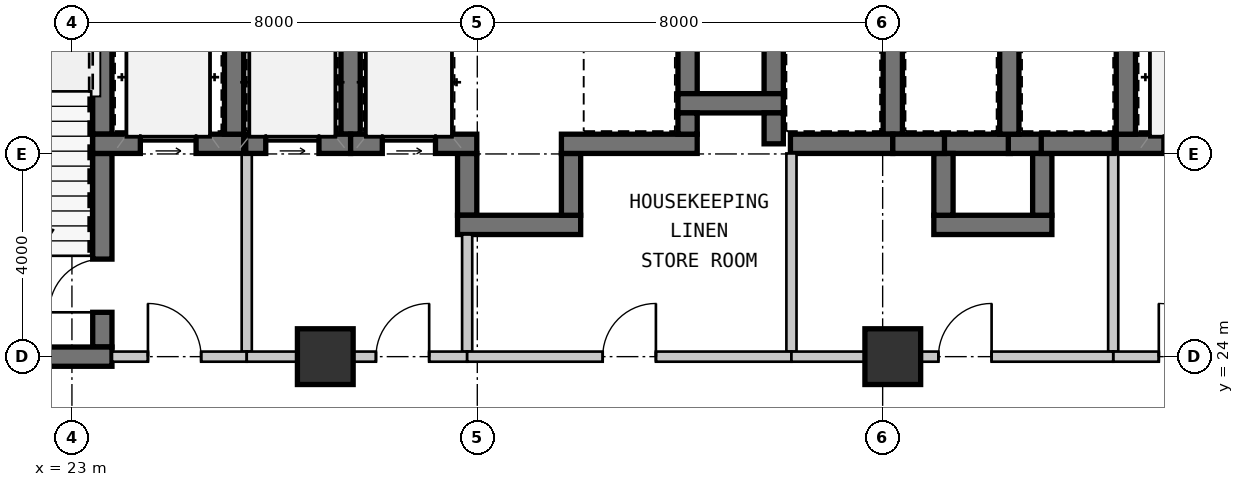
"""IFC4 building model, lengths in metres.
Left out: names, types, materials, properties, quantities, classifications, styles, units other than length and angle.
Written with IfcOpenShell. Run it as: python <this file> out.ifc"""

import sys

from ifc_helpers import new_model, si_unit, direction, frame, frame_2d, origin, origin_2d, place, context, subcontext, project, spatial, rectangle, extrude, source, transform, mapped, element, fill, save


model = new_model("IFC4")
c1 = context("Model", 3, precision=1e-05, world=origin(), true_north=direction((0.0, 1.0)))
c2 = subcontext(c1, "Body", "Model", "MODEL_VIEW")
j1 = project(units=[si_unit("LENGTHUNIT", "METRE"), si_unit("PLANEANGLEUNIT", "RADIAN")], contexts=[c1])
p1 = place(None, origin())
s1 = spatial("IfcSite", under=j1, at=p1, CompositionType="ELEMENT")
p2 = place(p1, origin())
s2 = spatial("IfcBuilding", under=s1, at=p2, CompositionType="ELEMENT")
p3 = place(p2, frame((0.0, 0.0, 16.8)))
s3 = spatial("IfcBuildingStorey", under=s2, at=p3, CompositionType="ELEMENT", Elevation=16.8)
m1 = source(origin(), c2, "Body", "SweptSolid", [
    extrude(rectangle(XDim=1.1, YDim=1.1, at=origin_2d()), origin(), (0.0, 0.0, 1.0), 3.15),
])
for number, where, z_axis, x_axis in (
    (1, (28.0, 24.0, 0.0), (0.0, 0.0, 1.0), (1.0, 0.0, 0.0)),
    (2, (39.2, 24.0, 0.0), (0.0, 0.0, 1.0), (1.0, 0.0, 0.0)),
):
    element("IfcColumn", number, at=place(p3, frame(where, z_axis=z_axis, x_axis=x_axis)), inside=s3, PredefinedType="COLUMN", context=c2, shape_type="MappedRepresentation", body=[
        mapped(m1, transform((0.0, 0.0, 0.0), scale=1.0)),
    ])
m2 = source(origin(), c2, "Body", "SweptSolid", [
    extrude(rectangle(XDim=3.42, YDim=0.38, at=frame_2d((1.71, 0.0))), origin(), (0.0, 0.0, 1.0), 2.93),
])
p4 = place(p3, frame((23.6, 28.39, 0.0), z_axis=(0.0, 0.0, 1.0), x_axis=(0.0, 1.0, 0.0)))
e3 = element("IfcWall", 3, at=p4, inside=s3, PredefinedType="SHEAR", context=c2, shape_type="MappedRepresentation", body=[
    mapped(m2, transform((0.0, 0.0, 0.0), scale=1.0)),
])
m3 = source(origin(), c2, "Body", "SweptSolid", [
    extrude(rectangle(XDim=3.82, YDim=0.38, at=frame_2d((1.91, 0.0))), origin(), (0.0, 0.0, 1.0), 2.93),
])
p5 = place(p3, frame((23.6, 24.19, 0.0), z_axis=(0.0, 0.0, 1.0), x_axis=(0.0, 1.0, 0.0)))
e4 = element("IfcWall", 4, at=p5, inside=s3, PredefinedType="SHEAR", context=c2, shape_type="MappedRepresentation", body=[
    mapped(m3, transform((0.0, 0.0, 0.0), scale=1.0)),
])
m4 = source(origin(), c2, "Body", "SweptSolid", [
    extrude(rectangle(XDim=1.05, YDim=2.1, at=frame_2d((0.525, 1.05))), frame((0.0, 0.2, 0.0), z_axis=(0.0, -1.0, 0.0), x_axis=(1.0, 0.0, 0.0)), (0.0, 0.0, 1.0), 0.4),
])
p6 = place(p5, frame((0.685, 0.0, 0.0)))
e5 = element("IfcOpeningElement", 5, at=p6, cuts=e4, PredefinedType="OPENING", context=c2, shape_type="MappedRepresentation", body=[
    mapped(m4, transform((0.0, 0.0, 0.0), scale=1.0)),
])
m5 = source(origin(), c2, "Body", "SweptSolid", [
    extrude(rectangle(XDim=4.98, YDim=0.38, at=frame_2d((2.49, 0.0))), origin(), (0.0, 0.0, 1.0), 2.93),
])
p7 = place(p3, frame((18.81, 24.0, 0.0), z_axis=(0.0, 0.0, 1.0), x_axis=(1.0, 0.0, 0.0)))
e6 = element("IfcWall", 6, at=p7, inside=s3, PredefinedType="SHEAR", context=c2, shape_type="MappedRepresentation", body=[
    mapped(m5, transform((0.0, 0.0, 0.0), scale=1.0)),
])
m6 = source(origin(), c2, "Body", "SweptSolid", [
    extrude(rectangle(XDim=2.98, YDim=0.38, at=frame_2d((1.49, 0.0))), origin(), (0.0, 0.0, 1.0), 2.93),
])
p8 = place(p3, frame((23.41, 28.2, 0.0), z_axis=(0.0, 0.0, 1.0), x_axis=(1.0, 0.0, 0.0)))
e7 = element("IfcWall", 7, at=p8, inside=s3, PredefinedType="SHEAR", context=c2, shape_type="MappedRepresentation", body=[
    mapped(m6, transform((0.0, 0.0, 0.0), scale=1.0)),
])
m7 = source(origin(), c2, "Body", "SweptSolid", [
    extrude(rectangle(XDim=1.1, YDim=2.15, at=frame_2d((0.55, 1.075))), frame((0.0, 0.2, 0.0), z_axis=(0.0, -1.0, 0.0), x_axis=(1.0, 0.0, 0.0)), (0.0, 0.0, 1.0), 0.4),
])
p9 = place(p8, frame((0.94, 0.0, 0.0)))
e8 = element("IfcOpeningElement", 8, at=p9, cuts=e7, PredefinedType="OPENING", context=c2, shape_type="MappedRepresentation", body=[
    mapped(m7, transform((0.0, 0.0, 0.0), scale=1.0)),
])
p10 = place(p3, frame((26.2, 28.39, 0.0), z_axis=(0.0, 0.0, 1.0), x_axis=(0.0, 1.0, 0.0)))
e9 = element("IfcWall", 9, at=p10, inside=s3, PredefinedType="SHEAR", context=c2, shape_type="MappedRepresentation", body=[
    mapped(m2, transform((0.0, 0.0, 0.0), scale=1.0)),
])
m8 = source(origin(), c2, "Body", "SweptSolid", [
    extrude(rectangle(XDim=3.91, YDim=0.2, at=frame_2d((1.955, 0.0))), origin(), (0.0, 0.0, 1.0), 2.93),
])
p11 = place(p3, frame((26.45, 24.1, 0.0), z_axis=(0.0, 0.0, 1.0), x_axis=(0.0, 1.0, 0.0)))
e10 = element("IfcWall", 10, at=p11, inside=s3, PredefinedType="SOLIDWALL", context=c2, shape_type="MappedRepresentation", body=[
    mapped(m8, transform((0.0, 0.0, 0.0), scale=1.0)),
])
m9 = source(origin(), c2, "Body", "SweptSolid", [
    extrude(rectangle(XDim=2.66, YDim=0.2, at=frame_2d((1.33, 0.0))), origin(), (0.0, 0.0, 1.0), 2.47),
])
p12 = place(p3, frame((23.79, 24.0, 0.0), z_axis=(0.0, 0.0, 1.0), x_axis=(1.0, 0.0, 0.0)))
e11 = element("IfcWall", 11, at=p12, inside=s3, PredefinedType="SOLIDWALL", context=c2, shape_type="MappedRepresentation", body=[
    mapped(m9, transform((0.0, 0.0, 0.0), scale=1.0)),
])
m10 = source(origin(), c2, "Body", "SweptSolid", [
    extrude(rectangle(XDim=1.05, YDim=2.1, at=frame_2d((0.525, 1.05))), frame((0.0, 0.11, 0.0), z_axis=(0.0, -1.0, 0.0), x_axis=(1.0, 0.0, 0.0)), (0.0, 0.0, 1.0), 0.22),
])
p13 = place(p12, frame((0.71, 0.0, 0.0)))
e12 = element("IfcOpeningElement", 12, at=p13, cuts=e11, PredefinedType="OPENING", context=c2, shape_type="MappedRepresentation", body=[
    mapped(m10, transform((0.0, 0.0, 0.0), scale=1.0)),
])
p14 = place(p3, frame((43.61, 28.2, 0.0), z_axis=(0.0, 0.0, 1.0), x_axis=(1.0, 0.0, 0.0)))
e13 = element("IfcWall", 13, at=p14, inside=s3, PredefinedType="SHEAR", context=c2, shape_type="MappedRepresentation", body=[
    mapped(m6, transform((0.0, 0.0, 0.0), scale=1.0)),
])
p15 = place(p14, frame((0.94, 0.0, 0.0)))
e14 = element("IfcOpeningElement", 14, at=p15, cuts=e13, PredefinedType="OPENING", context=c2, shape_type="MappedRepresentation", body=[
    mapped(m7, transform((0.0, 0.0, 0.0), scale=1.0)),
])
p16 = place(p3, frame((43.8, 31.81, 0.0), z_axis=(0.0, 0.0, 1.0), x_axis=(0.0, -1.0, 0.0)))
e15 = element("IfcWall", 15, at=p16, inside=s3, PredefinedType="SHEAR", context=c2, shape_type="MappedRepresentation", body=[
    mapped(m2, transform((0.0, 0.0, 0.0), scale=1.0)),
])
p17 = place(p3, frame((43.55, 28.01, 0.0), z_axis=(0.0, 0.0, 1.0), x_axis=(0.0, -1.0, 0.0)))
e16 = element("IfcWall", 16, at=p17, inside=s3, PredefinedType="SOLIDWALL", context=c2, shape_type="MappedRepresentation", body=[
    mapped(m8, transform((0.0, 0.0, 0.0), scale=1.0)),
])
m11 = source(origin(), c2, "Body", "SweptSolid", [
    extrude(rectangle(XDim=2.66, YDim=0.2, at=frame_2d((1.33, 0.0))), origin(), (0.0, 0.0, 1.0), 2.397),
])
p18 = place(p3, frame((43.55, 24.0, 0.0), z_axis=(0.0, 0.0, 1.0), x_axis=(1.0, 0.0, 0.0)))
e17 = element("IfcWall", 17, at=p18, inside=s3, PredefinedType="SOLIDWALL", context=c2, shape_type="MappedRepresentation", body=[
    mapped(m11, transform((0.0, 0.0, 0.0), scale=1.0)),
])
p19 = place(p18, frame((0.9, 0.0, 0.0)))
e18 = element("IfcOpeningElement", 18, at=p19, cuts=e17, PredefinedType="OPENING", context=c2, shape_type="MappedRepresentation", body=[
    mapped(m10, transform((0.0, 0.0, 0.0), scale=1.0)),
])
m12 = source(origin(), c2, "Body", "SweptSolid", [
    extrude(rectangle(XDim=1.12, YDim=0.38, at=frame_2d((0.56, 0.0))), origin(), (0.0, 0.0, 1.0), 2.93),
])
for number, where, z_axis, x_axis in (
    (19, (35.15, 30.31, 0.0), (0.0, 0.0, 1.0), (0.0, -1.0, 0.0)),
    (20, (36.85, 29.19, 0.0), (0.0, 0.0, 1.0), (0.0, 1.0, 0.0)),
):
    element("IfcWall", number, at=place(p3, frame(where, z_axis=z_axis, x_axis=x_axis)), inside=s3, PredefinedType="SHEAR", context=c2, shape_type="MappedRepresentation", body=[
        mapped(m12, transform((0.0, 0.0, 0.0), scale=1.0)),
    ])
m13 = source(origin(), c2, "Body", "SweptSolid", [
    extrude(rectangle(XDim=2.08, YDim=0.38, at=frame_2d((1.04, 0.0))), origin(), (0.0, 0.0, 1.0), 2.93),
])
p20 = place(p3, frame((34.96, 29.0, 0.0), z_axis=(0.0, 0.0, 1.0), x_axis=(1.0, 0.0, 0.0)))
e21 = element("IfcWall", 21, at=p20, inside=s3, PredefinedType="SHEAR", context=c2, shape_type="MappedRepresentation", body=[
    mapped(m13, transform((0.0, 0.0, 0.0), scale=1.0)),
])
m14 = source(origin(), c2, "Body", "SweptSolid", [
    extrude(rectangle(XDim=1.22, YDim=0.38, at=frame_2d((0.61, 0.0))), origin(), (0.0, 0.0, 1.0), 2.93),
])
p21 = place(p3, frame((30.8, 28.01, 0.0), z_axis=(0.0, 0.0, 1.0), x_axis=(0.0, -1.0, 0.0)))
e22 = element("IfcWall", 22, at=p21, inside=s3, PredefinedType="SHEAR", context=c2, shape_type="MappedRepresentation", body=[
    mapped(m14, transform((0.0, 0.0, 0.0), scale=1.0)),
])
m15 = source(origin(), c2, "Body", "SweptSolid", [
    extrude(rectangle(XDim=2.43, YDim=0.38, at=frame_2d((1.215, 0.0))), origin(), (0.0, 0.0, 1.0), 2.93),
])
p22 = place(p3, frame((30.61, 26.6, 0.0), z_axis=(0.0, 0.0, 1.0), x_axis=(1.0, 0.0, 0.0)))
e23 = element("IfcWall", 23, at=p22, inside=s3, PredefinedType="SHEAR", context=c2, shape_type="MappedRepresentation", body=[
    mapped(m15, transform((0.0, 0.0, 0.0), scale=1.0)),
])
p23 = place(p3, frame((32.85, 26.79, 0.0), z_axis=(0.0, 0.0, 1.0), x_axis=(0.0, 1.0, 0.0)))
e24 = element("IfcWall", 24, at=p23, inside=s3, PredefinedType="SHEAR", context=c2, shape_type="MappedRepresentation", body=[
    mapped(m14, transform((0.0, 0.0, 0.0), scale=1.0)),
])
m16 = source(origin(), c2, "Body", "SweptSolid", [
    extrude(rectangle(XDim=1.32, YDim=0.38, at=frame_2d((0.66, 0.0))), origin(), (0.0, 0.0, 1.0), 2.93),
])
p24 = place(p3, frame((41.52, 28.2, 0.0), z_axis=(0.0, 0.0, 1.0), x_axis=(-1.0, 0.0, 0.0)))
e25 = element("IfcWall", 25, at=p24, inside=s3, PredefinedType="SHEAR", context=c2, shape_type="MappedRepresentation", body=[
    mapped(m16, transform((0.0, 0.0, 0.0), scale=1.0)),
])
m17 = source(origin(), c2, "Body", "SweptSolid", [
    extrude(rectangle(XDim=0.67, YDim=0.38, at=frame_2d((0.335, 0.0))), origin(), (0.0, 0.0, 1.0), 2.93),
])
p25 = place(p3, frame((42.15, 28.2, 0.0), z_axis=(0.0, 0.0, 1.0), x_axis=(-1.0, 0.0, 0.0)))
e26 = element("IfcWall", 26, at=p25, inside=s3, PredefinedType="SHEAR", context=c2, shape_type="MappedRepresentation", body=[
    mapped(m17, transform((0.0, 0.0, 0.0), scale=1.0)),
])
m18 = source(origin(), c2, "Body", "SweptSolid", [
    extrude(rectangle(XDim=2.33, YDim=0.38, at=frame_2d((1.165, 0.0))), origin(), (0.0, 0.0, 1.0), 2.93),
])
p26 = place(p3, frame((40.01, 26.6, 0.0), z_axis=(0.0, 0.0, 1.0), x_axis=(1.0, 0.0, 0.0)))
e27 = element("IfcWall", 27, at=p26, inside=s3, PredefinedType="SHEAR", context=c2, shape_type="MappedRepresentation", body=[
    mapped(m18, transform((0.0, 0.0, 0.0), scale=1.0)),
])
for number, where, z_axis, x_axis in (
    (28, (40.2, 28.01, 0.0), (0.0, 0.0, 1.0), (0.0, -1.0, 0.0)),
    (29, (42.15, 26.79, 0.0), (0.0, 0.0, 1.0), (0.0, 1.0, 0.0)),
):
    element("IfcWall", number, at=place(p3, frame(where, z_axis=z_axis, x_axis=x_axis)), inside=s3, PredefinedType="SHEAR", context=c2, shape_type="MappedRepresentation", body=[
        mapped(m14, transform((0.0, 0.0, 0.0), scale=1.0)),
    ])
p27 = place(p3, frame((28.5, 28.39, 0.0), z_axis=(0.0, 0.0, 1.0), x_axis=(0.0, 1.0, 0.0)))
e30 = element("IfcWall", 30, at=p27, inside=s3, PredefinedType="SHEAR", context=c2, shape_type="MappedRepresentation", body=[
    mapped(m2, transform((0.0, 0.0, 0.0), scale=1.0)),
])
m19 = source(origin(), c2, "Body", "SweptSolid", [
    extrude(rectangle(XDim=2.07, YDim=0.38, at=frame_2d((1.035, 0.0))), origin(), (0.0, 0.0, 1.0), 2.93),
])
p28 = place(p3, frame((26.43, 28.2, 0.0), z_axis=(0.0, 0.0, 1.0), x_axis=(1.0, 0.0, 0.0)))
e31 = element("IfcWall", 31, at=p28, inside=s3, PredefinedType="SHEAR", context=c2, shape_type="MappedRepresentation", body=[
    mapped(m19, transform((0.0, 0.0, 0.0), scale=1.0)),
])
m20 = source(origin(), c2, "Body", "SweptSolid", [
    extrude(rectangle(XDim=1.05, YDim=2.15, at=frame_2d((0.525, 1.075))), frame((0.0, 0.2, 0.0), z_axis=(0.0, -1.0, 0.0), x_axis=(1.0, 0.0, 0.0)), (0.0, 0.0, 1.0), 0.4),
])
p29 = place(p28, frame((0.395, 0.0, 0.0)))
e32 = element("IfcOpeningElement", 32, at=p29, cuts=e31, PredefinedType="OPENING", context=c2, shape_type="MappedRepresentation", body=[
    mapped(m20, transform((0.0, 0.0, 0.0), scale=1.0)),
])
m21 = source(origin(), c2, "Body", "SweptSolid", [
    extrude(rectangle(XDim=2.49, YDim=0.38, at=frame_2d((1.245, 0.0))), origin(), (0.0, 0.0, 1.0), 2.93),
])
p30 = place(p3, frame((28.5, 28.2, 0.0), z_axis=(0.0, 0.0, 1.0), x_axis=(1.0, 0.0, 0.0)))
e33 = element("IfcWall", 33, at=p30, inside=s3, PredefinedType="SHEAR", context=c2, shape_type="MappedRepresentation", body=[
    mapped(m21, transform((0.0, 0.0, 0.0), scale=1.0)),
])
p31 = place(p30, frame((0.625, 0.0, 0.0)))
e34 = element("IfcOpeningElement", 34, at=p31, cuts=e33, PredefinedType="OPENING", context=c2, shape_type="MappedRepresentation", body=[
    mapped(m20, transform((0.0, 0.0, 0.0), scale=1.0)),
])
m22 = source(origin(), c2, "Body", "SweptSolid", [
    extrude(rectangle(XDim=2.31, YDim=0.2, at=frame_2d((1.155, 0.0))), origin(), (0.0, 0.0, 1.0), 2.93),
])
p32 = place(p3, frame((30.8, 26.41, 0.0), z_axis=(0.0, 0.0, 1.0), x_axis=(0.0, -1.0, 0.0)))
e35 = element("IfcWall", 35, at=p32, inside=s3, PredefinedType="SOLIDWALL", context=c2, shape_type="MappedRepresentation", body=[
    mapped(m22, transform((0.0, 0.0, 0.0), scale=1.0)),
])
m23 = source(origin(), c2, "Body", "SweptSolid", [
    extrude(rectangle(XDim=4.35, YDim=0.2, at=frame_2d((2.175, 0.0))), origin(), (0.0, 0.0, 1.0), 2.47),
])
p33 = place(p3, frame((30.8, 24.0, 0.0), z_axis=(0.0, 0.0, 1.0), x_axis=(-1.0, 0.0, 0.0)))
e36 = element("IfcWall", 36, at=p33, inside=s3, PredefinedType="SOLIDWALL", context=c2, shape_type="MappedRepresentation", body=[
    mapped(m23, transform((0.0, 0.0, 0.0), scale=1.0)),
])
p34 = place(p33, frame((0.75, 0.0, 0.0)))
e37 = element("IfcOpeningElement", 37, at=p34, cuts=e36, PredefinedType="OPENING", context=c2, shape_type="MappedRepresentation", body=[
    mapped(m10, transform((0.0, 0.0, 0.0), scale=1.0)),
])
m24 = source(origin(), c2, "Body", "SweptSolid", [
    extrude(rectangle(XDim=2.68, YDim=0.38, at=frame_2d((1.34, 0.0))), origin(), (0.0, 0.0, 1.0), 2.93),
])
p35 = place(p3, frame((32.66, 28.2, 0.0), z_axis=(0.0, 0.0, 1.0), x_axis=(1.0, 0.0, 0.0)))
e38 = element("IfcWall", 38, at=p35, inside=s3, PredefinedType="SHEAR", context=c2, shape_type="MappedRepresentation", body=[
    mapped(m24, transform((0.0, 0.0, 0.0), scale=1.0)),
])
m25 = source(origin(), c2, "Body", "SweptSolid", [
    extrude(rectangle(XDim=0.42, YDim=0.38, at=frame_2d((0.21, 0.0))), origin(), (0.0, 0.0, 1.0), 2.93),
])
p36 = place(p3, frame((35.15, 28.39, 0.0), z_axis=(0.0, 0.0, 1.0), x_axis=(0.0, 1.0, 0.0)))
e39 = element("IfcWall", 39, at=p36, inside=s3, PredefinedType="SHEAR", context=c2, shape_type="MappedRepresentation", body=[
    mapped(m25, transform((0.0, 0.0, 0.0), scale=1.0)),
])
p37 = place(p3, frame((39.2, 28.39, 0.0), z_axis=(0.0, 0.0, 1.0), x_axis=(0.0, 1.0, 0.0)))
e40 = element("IfcWall", 40, at=p37, inside=s3, PredefinedType="SHEAR", context=c2, shape_type="MappedRepresentation", body=[
    mapped(m2, transform((0.0, 0.0, 0.0), scale=1.0)),
])
m26 = source(origin(), c2, "Body", "SweptSolid", [
    extrude(rectangle(XDim=0.61, YDim=0.38, at=frame_2d((0.305, 0.0))), origin(), (0.0, 0.0, 1.0), 2.93),
])
p38 = place(p3, frame((36.85, 28.81, 0.0), z_axis=(0.0, 0.0, 1.0), x_axis=(0.0, -1.0, 0.0)))
e41 = element("IfcWall", 41, at=p38, inside=s3, PredefinedType="SHEAR", context=c2, shape_type="MappedRepresentation", body=[
    mapped(m26, transform((0.0, 0.0, 0.0), scale=1.0)),
])
m27 = source(origin(), c2, "Body", "SweptSolid", [
    extrude(rectangle(XDim=2.02, YDim=0.38, at=frame_2d((1.01, 0.0))), origin(), (0.0, 0.0, 1.0), 2.93),
])
p39 = place(p3, frame((37.18, 28.2, 0.0), z_axis=(0.0, 0.0, 1.0), x_axis=(1.0, 0.0, 0.0)))
e42 = element("IfcWall", 42, at=p39, inside=s3, PredefinedType="SHEAR", context=c2, shape_type="MappedRepresentation", body=[
    mapped(m27, transform((0.0, 0.0, 0.0), scale=1.0)),
])
p40 = place(p3, frame((41.5, 28.39, 0.0), z_axis=(0.0, 0.0, 1.0), x_axis=(0.0, 1.0, 0.0)))
e43 = element("IfcWall", 43, at=p40, inside=s3, PredefinedType="SHEAR", context=c2, shape_type="MappedRepresentation", body=[
    mapped(m2, transform((0.0, 0.0, 0.0), scale=1.0)),
])
m28 = source(origin(), c2, "Body", "SweptSolid", [
    extrude(rectangle(XDim=1.02, YDim=0.38, at=frame_2d((0.51, 0.0))), origin(), (0.0, 0.0, 1.0), 2.93),
])
p41 = place(p3, frame((39.2, 28.2, 0.0), z_axis=(0.0, 0.0, 1.0), x_axis=(1.0, 0.0, 0.0)))
e44 = element("IfcWall", 44, at=p41, inside=s3, PredefinedType="SHEAR", context=c2, shape_type="MappedRepresentation", body=[
    mapped(m28, transform((0.0, 0.0, 0.0), scale=1.0)),
])
m29 = source(origin(), c2, "Body", "SweptSolid", [
    extrude(rectangle(XDim=1.44, YDim=0.38, at=frame_2d((0.72, 0.0))), origin(), (0.0, 0.0, 1.0), 2.93),
])
p42 = place(p3, frame((42.13, 28.2, 0.0), z_axis=(0.0, 0.0, 1.0), x_axis=(1.0, 0.0, 0.0)))
e45 = element("IfcWall", 45, at=p42, inside=s3, PredefinedType="SHEAR", context=c2, shape_type="MappedRepresentation", body=[
    mapped(m29, transform((0.0, 0.0, 0.0), scale=1.0)),
])
p43 = place(p3, frame((37.2, 28.01, 0.0), z_axis=(0.0, 0.0, 1.0), x_axis=(0.0, -1.0, 0.0)))
e46 = element("IfcWall", 46, at=p43, inside=s3, PredefinedType="SOLIDWALL", context=c2, shape_type="MappedRepresentation", body=[
    mapped(m8, transform((0.0, 0.0, 0.0), scale=1.0)),
])
m30 = source(origin(), c2, "Body", "SweptSolid", [
    extrude(rectangle(XDim=6.4, YDim=0.2, at=frame_2d((3.2, 0.0))), origin(), (0.0, 0.0, 1.0), 2.47),
])
p44 = place(p3, frame((37.2, 24.0, 0.0), z_axis=(0.0, 0.0, 1.0), x_axis=(-1.0, 0.0, 0.0)))
e47 = element("IfcWall", 47, at=p44, inside=s3, PredefinedType="SOLIDWALL", context=c2, shape_type="MappedRepresentation", body=[
    mapped(m30, transform((0.0, 0.0, 0.0), scale=1.0)),
])
p45 = place(p44, frame((2.675, 0.0, 0.0)))
e48 = element("IfcOpeningElement", 48, at=p45, cuts=e47, PredefinedType="OPENING", context=c2, shape_type="MappedRepresentation", body=[
    mapped(m10, transform((0.0, 0.0, 0.0), scale=1.0)),
])
m31 = source(origin(), c2, "Body", "SweptSolid", [
    extrude(rectangle(XDim=4.35, YDim=0.2, at=frame_2d((2.175, 0.0))), origin(), (0.0, 0.0, 1.0), 2.397),
])
p46 = place(p3, frame((43.55, 24.0, 0.0), z_axis=(0.0, 0.0, 1.0), x_axis=(-1.0, 0.0, 0.0)))
e49 = element("IfcWall", 49, at=p46, inside=s3, PredefinedType="SOLIDWALL", context=c2, shape_type="MappedRepresentation", body=[
    mapped(m31, transform((0.0, 0.0, 0.0), scale=1.0)),
])
p47 = place(p46, frame((2.4, 0.0, 0.0)))
e50 = element("IfcOpeningElement", 50, at=p47, cuts=e49, PredefinedType="OPENING", context=c2, shape_type="MappedRepresentation", body=[
    mapped(m10, transform((0.0, 0.0, 0.0), scale=1.0)),
])
m32 = source(origin(), c2, "Body", "SweptSolid", [
    extrude(rectangle(XDim=2.0, YDim=0.2, at=frame_2d((1.0, 0.0))), origin(), (0.0, 0.0, 1.0), 2.47),
])
p48 = place(p3, frame((39.2, 24.0, 0.0), z_axis=(0.0, 0.0, 1.0), x_axis=(-1.0, 0.0, 0.0)))
e51 = element("IfcWall", 51, at=p48, inside=s3, PredefinedType="SOLIDWALL", context=c2, shape_type="MappedRepresentation", body=[
    mapped(m32, transform((0.0, 0.0, 0.0), scale=1.0)),
])
m33 = source(origin(), c2, "Body", "SweptSolid", [
    extrude(rectangle(XDim=1.05, YDim=2.1, at=frame_2d((0.525, 1.05))), frame((0.0, 0.025, 0.0), z_axis=(0.0, -1.0, 0.0), x_axis=(1.0, 0.0, 0.0)), (0.0, 0.0, 1.0), 0.05),
])
p49 = place(p6, origin())
e52 = element("IfcDoor", 52, at=p49, inside=s3, OperationType="SINGLE_SWING_LEFT", PredefinedType="DOOR", context=c2, shape_type="MappedRepresentation", body=[
    mapped(m33, transform((0.0, 0.0, 0.0), scale=1.0)),
])
fill(e5, e52)
m34 = source(origin(), c2, "Body", "SweptSolid", [
    extrude(rectangle(XDim=1.1, YDim=2.15, at=frame_2d((0.55, 1.075))), frame((0.0, 0.025, 0.0), z_axis=(0.0, -1.0, 0.0), x_axis=(1.0, 0.0, 0.0)), (0.0, 0.0, 1.0), 0.05),
])
p50 = place(p9, origin())
e53 = element("IfcDoor", 53, at=p50, inside=s3, OperationType="SLIDING_TO_LEFT", PredefinedType="DOOR", context=c2, shape_type="MappedRepresentation", body=[
    mapped(m34, transform((0.0, 0.0, 0.0), scale=1.0)),
])
fill(e8, e53)
p51 = place(p13, origin())
e54 = element("IfcDoor", 54, at=p51, inside=s3, OperationType="SINGLE_SWING_LEFT", PredefinedType="DOOR", context=c2, shape_type="MappedRepresentation", body=[
    mapped(m33, transform((0.0, 0.0, 0.0), scale=1.0)),
])
fill(e12, e54)
p52 = place(p19, origin())
e55 = element("IfcDoor", 55, at=p52, inside=s3, OperationType="SINGLE_SWING_LEFT", PredefinedType="DOOR", context=c2, shape_type="MappedRepresentation", body=[
    mapped(m33, transform((0.0, 0.0, 0.0), scale=1.0)),
])
fill(e18, e55)
m35 = source(origin(), c2, "Body", "SweptSolid", [
    extrude(rectangle(XDim=1.05, YDim=2.15, at=frame_2d((0.525, 1.075))), frame((0.0, 0.025, 0.0), z_axis=(0.0, -1.0, 0.0), x_axis=(1.0, 0.0, 0.0)), (0.0, 0.0, 1.0), 0.05),
])
p53 = place(p29, origin())
e56 = element("IfcDoor", 56, at=p53, inside=s3, OperationType="SLIDING_TO_LEFT", PredefinedType="DOOR", context=c2, shape_type="MappedRepresentation", body=[
    mapped(m35, transform((0.0, 0.0, 0.0), scale=1.0)),
])
fill(e32, e56)
p54 = place(p31, origin())
e57 = element("IfcDoor", 57, at=p54, inside=s3, OperationType="SLIDING_TO_LEFT", PredefinedType="DOOR", context=c2, shape_type="MappedRepresentation", body=[
    mapped(m35, transform((0.0, 0.0, 0.0), scale=1.0)),
])
fill(e34, e57)
p55 = place(p34, frame((1.05, 0.0, 0.0), z_axis=(0.0, 0.0, 1.0), x_axis=(-1.0, 0.0, 0.0)))
e58 = element("IfcDoor", 58, at=p55, inside=s3, OperationType="SINGLE_SWING_RIGHT", PredefinedType="DOOR", context=c2, shape_type="MappedRepresentation", body=[
    mapped(m33, transform((0.0, 0.0, 0.0), scale=1.0)),
])
fill(e37, e58)
p56 = place(p45, frame((1.05, 0.0, 0.0), z_axis=(0.0, 0.0, 1.0), x_axis=(-1.0, 0.0, 0.0)))
e59 = element("IfcDoor", 59, at=p56, inside=s3, OperationType="SINGLE_SWING_RIGHT", PredefinedType="DOOR", context=c2, shape_type="MappedRepresentation", body=[
    mapped(m33, transform((0.0, 0.0, 0.0), scale=1.0)),
])
fill(e48, e59)
p57 = place(p47, frame((1.05, 0.0, 0.0), z_axis=(0.0, 0.0, 1.0), x_axis=(-1.0, 0.0, 0.0)))
e60 = element("IfcDoor", 60, at=p57, inside=s3, OperationType="SINGLE_SWING_RIGHT", PredefinedType="DOOR", context=c2, shape_type="MappedRepresentation", body=[
    mapped(m33, transform((0.0, 0.0, 0.0), scale=1.0)),
])
fill(e50, e60)
save(model, sys.argv[1])
